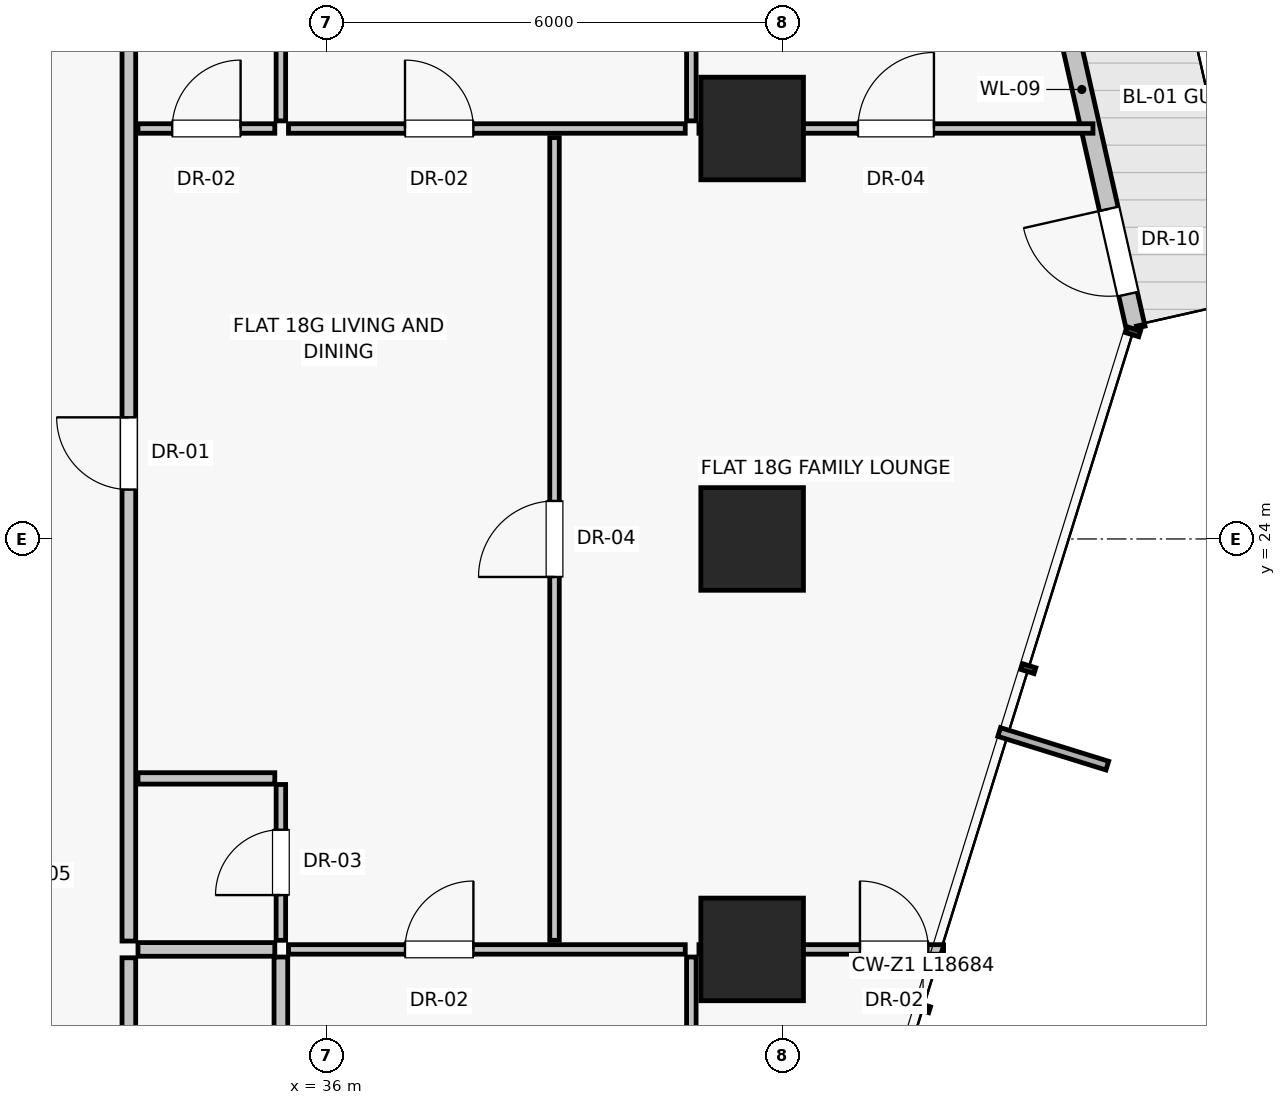
"""IFC4 building model, lengths in metres.
Left out: names, types, materials, properties, quantities, classifications, styles, units other than length and angle.
Written with IfcOpenShell. Run it as: python <this file> out.ifc"""

import sys

from ifc_helpers import new_model, si_unit, direction, frame, frame_2d, origin, origin_2d, place, context, subcontext, project, spatial, rectangle, extrude, source, transform, mapped, element, fill, save


model = new_model("IFC4")
c1 = context("Model", 3, precision=1e-05, world=origin(), true_north=direction((0.0, 1.0)))
c2 = subcontext(c1, "Body", "Model", "MODEL_VIEW")
j1 = project(units=[si_unit("LENGTHUNIT", "METRE"), si_unit("PLANEANGLEUNIT", "RADIAN")], contexts=[c1])
p1 = place(None, origin())
s1 = spatial("IfcSite", under=j1, at=p1, CompositionType="ELEMENT")
p2 = place(p1, origin())
s2 = spatial("IfcBuilding", under=s1, at=p2, CompositionType="ELEMENT")
p3 = place(p2, frame((0.0, 0.0, 67.35)))
s3 = spatial("IfcBuildingStorey", under=s2, at=p3, CompositionType="ELEMENT", Elevation=67.35)
for number, where, z_axis, x_axis in (
    (1, (41.6, 18.6, 0.0), (0.0, 0.0, 1.0), (1.0, 0.0, 0.0)),
    (2, (41.6, 24.0, 0.0), (0.0, 0.0, 1.0), (1.0, 0.0, 0.0)),
    (3, (41.6, 29.4, 0.0), (0.0, 0.0, 1.0), (1.0, 0.0, 0.0)),
):
    element("IfcColumn", number, at=place(p3, frame(where, z_axis=z_axis, x_axis=x_axis)), inside=s3, PredefinedType="COLUMN", context=c2, shape_type="SweptSolid", body=[
        extrude(rectangle(XDim=1.35, YDim=1.35, at=origin_2d()), origin(), (0.0, 0.0, 1.0), 3.25),
    ])
p4 = place(p3, frame((46.647, 26.773, 0.0), z_axis=(0.0, 0.0, 1.0), x_axis=(-0.220535742642, 0.97537889367, 0.0)))
e4 = element("IfcWall", 4, at=p4, inside=s3, PredefinedType="SOLIDWALL", context=c2, shape_type="SweptSolid", body=[
    extrude(rectangle(XDim=4.58, YDim=0.25, at=frame_2d((2.29, 0.0))), origin(), (0.0, 0.0, 1.0), 3.0),
])
p5 = place(p4, frame((0.46, 0.0, 0.0)))
e5 = element("IfcOpeningElement", 5, at=p5, cuts=e4, PredefinedType="OPENING", context=c2, shape_type="SweptSolid", body=[
    extrude(rectangle(XDim=1.15, YDim=2.25, at=frame_2d((0.575, 1.125))), frame((0.0, 0.135, 0.0), z_axis=(0.0, -1.0, 0.0), x_axis=(1.0, 0.0, 0.0)), (0.0, 0.0, 1.0), 0.27),
])
p6 = place(p3, frame((33.4, 14.31, 0.0), z_axis=(0.0, 0.0, 1.0), x_axis=(0.0, 1.0, 0.0)))
e6 = element("IfcWall", 6, at=p6, inside=s3, PredefinedType="PARTITIONING", context=c2, shape_type="SweptSolid", body=[
    extrude(rectangle(XDim=4.18, YDim=0.18, at=frame_2d((2.09, 0.0))), origin(), (0.0, 0.0, 1.0), 3.0),
])
p7 = place(p6, frame((1.59, 0.0, 0.0)))
e7 = element("IfcOpeningElement", 7, at=p7, cuts=e6, PredefinedType="OPENING", context=c2, shape_type="SweptSolid", body=[
    extrude(rectangle(XDim=1.0, YDim=2.01, at=frame_2d((0.5, 1.005))), frame((0.0, 0.1, 0.0), z_axis=(0.0, -1.0, 0.0), x_axis=(1.0, 0.0, 0.0)), (0.0, 0.0, 1.0), 0.2),
])
p8 = place(p3, frame((33.4, 18.71, 0.0), z_axis=(0.0, 0.0, 1.0), x_axis=(0.0, 1.0, 0.0)))
e8 = element("IfcWall", 8, at=p8, inside=s3, PredefinedType="PARTITIONING", context=c2, shape_type="SweptSolid", body=[
    extrude(rectangle(XDim=14.78, YDim=0.18, at=frame_2d((7.39, 0.0))), origin(), (0.0, 0.0, 1.0), 3.0),
])
p9 = place(p8, frame((5.94, 0.0, 0.0)))
e9 = element("IfcOpeningElement", 9, at=p9, cuts=e8, PredefinedType="OPENING", context=c2, shape_type="SweptSolid", body=[
    extrude(rectangle(XDim=0.95, YDim=2.02, at=frame_2d((0.475, 1.01))), frame((0.0, 0.1, 0.0), z_axis=(0.0, -1.0, 0.0), x_axis=(1.0, 0.0, 0.0)), (0.0, 0.0, 1.0), 0.2),
])
p10 = place(p3, frame((40.8, 14.32, 0.0), z_axis=(0.0, 0.0, 1.0), x_axis=(0.0, 1.0, 0.0)))
e10 = element("IfcWall", 10, at=p10, inside=s3, PredefinedType="PARTITIONING", context=c2, shape_type="SweptSolid", body=[
    extrude(rectangle(XDim=4.18, YDim=0.125, at=frame_2d((2.09, 0.0))), origin(), (0.0, 0.0, 1.0), 3.0),
])
p11 = place(p3, frame((40.9, 18.6, 0.0), z_axis=(0.0, 0.0, 1.0), x_axis=(1.0, 0.0, 0.0)))
e11 = element("IfcWall", 11, at=p11, inside=s3, PredefinedType="PARTITIONING", context=c2, shape_type="SweptSolid", body=[
    extrude(rectangle(XDim=3.219, YDim=0.125, at=frame_2d((1.609, 0.0))), origin(), (0.0, 0.0, 1.0), 2.299),
])
p12 = place(p11, frame((2.118, 0.0, 0.0)))
e12 = element("IfcOpeningElement", 12, at=p12, cuts=e11, PredefinedType="OPENING", context=c2, shape_type="SweptSolid", body=[
    extrude(rectangle(XDim=0.9, YDim=2.01, at=frame_2d((0.45, 1.005))), frame((0.0, 0.073, 0.0), z_axis=(0.0, -1.0, 0.0), x_axis=(1.0, 0.0, 0.0)), (0.0, 0.0, 1.0), 0.145),
])
p13 = place(p3, frame((40.8, 29.5, 0.0), z_axis=(0.0, 0.0, 1.0), x_axis=(0.0, 1.0, 0.0)))
e13 = element("IfcWall", 13, at=p13, inside=s3, PredefinedType="PARTITIONING", context=c2, shape_type="SweptSolid", body=[
    extrude(rectangle(XDim=3.98, YDim=0.125, at=frame_2d((1.99, 0.0))), origin(), (0.0, 0.0, 1.0), 3.0),
])
p14 = place(p3, frame((40.9, 29.4, 0.0), z_axis=(0.0, 0.0, 1.0), x_axis=(1.0, 0.0, 0.0)))
e14 = element("IfcWall", 14, at=p14, inside=s3, PredefinedType="PARTITIONING", context=c2, shape_type="SweptSolid", body=[
    extrude(rectangle(XDim=5.184, YDim=0.125, at=frame_2d((2.592, 0.0))), origin(), (0.0, 0.0, 1.0), 2.299),
])
p15 = place(p14, frame((2.092, 0.0, 0.0)))
e15 = element("IfcOpeningElement", 15, at=p15, cuts=e14, PredefinedType="OPENING", context=c2, shape_type="SweptSolid", body=[
    extrude(rectangle(XDim=1.0, YDim=2.01, at=frame_2d((0.5, 1.005))), frame((0.0, 0.073, 0.0), z_axis=(0.0, -1.0, 0.0), x_axis=(1.0, 0.0, 0.0)), (0.0, 0.0, 1.0), 0.145),
])
p16 = place(p3, frame((39.0, 18.72, 0.0), z_axis=(0.0, 0.0, 1.0), x_axis=(0.0, 1.0, 0.0)))
e16 = element("IfcWall", 16, at=p16, inside=s3, PredefinedType="PARTITIONING", context=c2, shape_type="SweptSolid", body=[
    extrude(rectangle(XDim=10.56, YDim=0.125, at=frame_2d((5.28, 0.0))), origin(), (0.0, 0.0, 1.0), 3.0),
])
p17 = place(p16, frame((4.78, 0.0, 0.0)))
e17 = element("IfcOpeningElement", 17, at=p17, cuts=e16, PredefinedType="OPENING", context=c2, shape_type="SweptSolid", body=[
    extrude(rectangle(XDim=1.0, YDim=2.01, at=frame_2d((0.5, 1.005))), frame((0.0, 0.073, 0.0), z_axis=(0.0, -1.0, 0.0), x_axis=(1.0, 0.0, 0.0)), (0.0, 0.0, 1.0), 0.145),
])
p18 = place(p3, frame((35.4, 14.32, 0.0), z_axis=(0.0, 0.0, 1.0), x_axis=(0.0, 1.0, 0.0)))
e18 = element("IfcWall", 18, at=p18, inside=s3, PredefinedType="PARTITIONING", context=c2, shape_type="SweptSolid", body=[
    extrude(rectangle(XDim=4.18, YDim=0.18, at=frame_2d((2.09, 0.0))), origin(), (0.0, 0.0, 1.0), 3.0),
])
p19 = place(p3, frame((33.52, 18.6, 0.0), z_axis=(0.0, 0.0, 1.0), x_axis=(1.0, 0.0, 0.0)))
e19 = element("IfcWall", 19, at=p19, inside=s3, PredefinedType="PARTITIONING", context=c2, shape_type="SweptSolid", body=[
    extrude(rectangle(XDim=1.8, YDim=0.18, at=frame_2d((0.9, 0.0))), origin(), (0.0, 0.0, 1.0), 3.0),
])
p20 = place(p3, frame((35.5, 18.6, 0.0), z_axis=(0.0, 0.0, 1.0), x_axis=(1.0, 0.0, 0.0)))
e20 = element("IfcWall", 20, at=p20, inside=s3, PredefinedType="PARTITIONING", context=c2, shape_type="SweptSolid", body=[
    extrude(rectangle(XDim=5.22, YDim=0.125, at=frame_2d((2.61, 0.0))), origin(), (0.0, 0.0, 1.0), 2.299),
])
p21 = place(p20, frame((1.533, 0.0, 0.0)))
e21 = element("IfcOpeningElement", 21, at=p21, cuts=e20, PredefinedType="OPENING", context=c2, shape_type="SweptSolid", body=[
    extrude(rectangle(XDim=0.9, YDim=2.01, at=frame_2d((0.45, 1.005))), frame((0.0, 0.073, 0.0), z_axis=(0.0, -1.0, 0.0), x_axis=(1.0, 0.0, 0.0)), (0.0, 0.0, 1.0), 0.145),
])
p22 = place(p3, frame((33.52, 20.85, 0.0), z_axis=(0.0, 0.0, 1.0), x_axis=(1.0, 0.0, 0.0)))
e22 = element("IfcWall", 22, at=p22, inside=s3, PredefinedType="PARTITIONING", context=c2, shape_type="SweptSolid", body=[
    extrude(rectangle(XDim=1.8, YDim=0.15, at=frame_2d((0.9, 0.0))), origin(), (0.0, 0.0, 1.0), 3.0),
])
p23 = place(p3, frame((35.4, 18.72, 0.0), z_axis=(0.0, 0.0, 1.0), x_axis=(0.0, 1.0, 0.0)))
e23 = element("IfcWall", 23, at=p23, inside=s3, PredefinedType="PARTITIONING", context=c2, shape_type="SweptSolid", body=[
    extrude(rectangle(XDim=2.05, YDim=0.125, at=frame_2d((1.025, 0.0))), origin(), (0.0, 0.0, 1.0), 3.0),
])
p24 = place(p23, frame((0.595, 0.0, 0.0)))
e24 = element("IfcOpeningElement", 24, at=p24, cuts=e23, PredefinedType="OPENING", context=c2, shape_type="SweptSolid", body=[
    extrude(rectangle(XDim=0.86, YDim=2.01, at=frame_2d((0.43, 1.005))), frame((0.0, 0.073, 0.0), z_axis=(0.0, -1.0, 0.0), x_axis=(1.0, 0.0, 0.0)), (0.0, 0.0, 1.0), 0.145),
])
p25 = place(p3, frame((33.52, 29.4, 0.0), z_axis=(0.0, 0.0, 1.0), x_axis=(1.0, 0.0, 0.0)))
e25 = element("IfcWall", 25, at=p25, inside=s3, PredefinedType="PARTITIONING", context=c2, shape_type="SweptSolid", body=[
    extrude(rectangle(XDim=1.8, YDim=0.125, at=frame_2d((0.9, 0.0))), origin(), (0.0, 0.0, 1.0), 3.0),
])
p26 = place(p25, frame((0.45, 0.0, 0.0)))
e26 = element("IfcOpeningElement", 26, at=p26, cuts=e25, PredefinedType="OPENING", context=c2, shape_type="SweptSolid", body=[
    extrude(rectangle(XDim=0.9, YDim=2.01, at=frame_2d((0.45, 1.005))), frame((0.0, 0.073, 0.0), z_axis=(0.0, -1.0, 0.0), x_axis=(1.0, 0.0, 0.0)), (0.0, 0.0, 1.0), 0.145),
])
p27 = place(p3, frame((35.4, 29.5, 0.0), z_axis=(0.0, 0.0, 1.0), x_axis=(0.0, 1.0, 0.0)))
e27 = element("IfcWall", 27, at=p27, inside=s3, PredefinedType="PARTITIONING", context=c2, shape_type="SweptSolid", body=[
    extrude(rectangle(XDim=3.98, YDim=0.125, at=frame_2d((1.99, 0.0))), origin(), (0.0, 0.0, 1.0), 3.0),
])
p28 = place(p3, frame((35.5, 29.4, 0.0), z_axis=(0.0, 0.0, 1.0), x_axis=(1.0, 0.0, 0.0)))
e28 = element("IfcWall", 28, at=p28, inside=s3, PredefinedType="PARTITIONING", context=c2, shape_type="SweptSolid", body=[
    extrude(rectangle(XDim=5.22, YDim=0.125, at=frame_2d((2.61, 0.0))), origin(), (0.0, 0.0, 1.0), 2.299),
])
p29 = place(p28, frame((1.533, 0.0, 0.0)))
e29 = element("IfcOpeningElement", 29, at=p29, cuts=e28, PredefinedType="OPENING", context=c2, shape_type="SweptSolid", body=[
    extrude(rectangle(XDim=0.9, YDim=2.01, at=frame_2d((0.45, 1.005))), frame((0.0, 0.073, 0.0), z_axis=(0.0, -1.0, 0.0), x_axis=(1.0, 0.0, 0.0)), (0.0, 0.0, 1.0), 0.145),
])
m1 = source(origin(), c2, "Body", "SweptSolid", [
    extrude(rectangle(XDim=1.15, YDim=2.25, at=frame_2d((0.575, 1.125))), frame((0.0, 0.025, 0.0), z_axis=(0.0, -1.0, 0.0), x_axis=(1.0, 0.0, 0.0)), (0.0, 0.0, 1.0), 0.05),
])
p30 = place(p5, frame((1.15, 0.0, 0.0), z_axis=(0.0, 0.0, 1.0), x_axis=(-1.0, 0.0, 0.0)))
e30 = element("IfcDoor", 30, at=p30, inside=s3, OperationType="SINGLE_SWING_RIGHT", PredefinedType="DOOR", context=c2, shape_type="MappedRepresentation", body=[
    mapped(m1, transform((0.0, 0.0, 0.0), scale=1.0)),
])
fill(e5, e30)
m2 = source(origin(), c2, "Body", "SweptSolid", [
    extrude(rectangle(XDim=0.95, YDim=2.02, at=frame_2d((0.475, 1.01))), frame((0.0, 0.025, 0.0), z_axis=(0.0, -1.0, 0.0), x_axis=(1.0, 0.0, 0.0)), (0.0, 0.0, 1.0), 0.05),
])
p31 = place(p9, origin())
e31 = element("IfcDoor", 31, at=p31, inside=s3, OperationType="SINGLE_SWING_RIGHT", PredefinedType="DOOR", context=c2, shape_type="MappedRepresentation", body=[
    mapped(m2, transform((0.0, 0.0, 0.0), scale=1.0)),
])
fill(e9, e31)
m3 = source(origin(), c2, "Body", "SweptSolid", [
    extrude(rectangle(XDim=0.9, YDim=2.01, at=frame_2d((0.45, 1.005))), frame((0.0, 0.025, 0.0), z_axis=(0.0, -1.0, 0.0), x_axis=(1.0, 0.0, 0.0)), (0.0, 0.0, 1.0), 0.05),
])
p32 = place(p12, origin())
e32 = element("IfcDoor", 32, at=p32, inside=s3, OperationType="SINGLE_SWING_LEFT", PredefinedType="DOOR", context=c2, shape_type="MappedRepresentation", body=[
    mapped(m3, transform((0.0, 0.0, 0.0), scale=1.0)),
])
fill(e12, e32)
m4 = source(origin(), c2, "Body", "SweptSolid", [
    extrude(rectangle(XDim=1.0, YDim=2.01, at=frame_2d((0.5, 1.005))), frame((0.0, 0.025, 0.0), z_axis=(0.0, -1.0, 0.0), x_axis=(1.0, 0.0, 0.0)), (0.0, 0.0, 1.0), 0.05),
])
p33 = place(p15, origin())
e33 = element("IfcDoor", 33, at=p33, inside=s3, OperationType="SINGLE_SWING_RIGHT", PredefinedType="DOOR", context=c2, shape_type="MappedRepresentation", body=[
    mapped(m4, transform((0.0, 0.0, 0.0), scale=1.0)),
])
fill(e15, e33)
p34 = place(p17, origin())
e34 = element("IfcDoor", 34, at=p34, inside=s3, OperationType="SINGLE_SWING_LEFT", PredefinedType="DOOR", context=c2, shape_type="MappedRepresentation", body=[
    mapped(m4, transform((0.0, 0.0, 0.0), scale=1.0)),
])
fill(e17, e34)
p35 = place(p21, origin())
e35 = element("IfcDoor", 35, at=p35, inside=s3, OperationType="SINGLE_SWING_RIGHT", PredefinedType="DOOR", context=c2, shape_type="MappedRepresentation", body=[
    mapped(m3, transform((0.0, 0.0, 0.0), scale=1.0)),
])
fill(e21, e35)
m5 = source(origin(), c2, "Body", "SweptSolid", [
    extrude(rectangle(XDim=0.86, YDim=2.01, at=frame_2d((0.43, 1.005))), frame((0.0, 0.025, 0.0), z_axis=(0.0, -1.0, 0.0), x_axis=(1.0, 0.0, 0.0)), (0.0, 0.0, 1.0), 0.05),
])
p36 = place(p24, origin())
e36 = element("IfcDoor", 36, at=p36, inside=s3, OperationType="SINGLE_SWING_LEFT", PredefinedType="DOOR", context=c2, shape_type="MappedRepresentation", body=[
    mapped(m5, transform((0.0, 0.0, 0.0), scale=1.0)),
])
fill(e24, e36)
p37 = place(p26, origin())
e37 = element("IfcDoor", 37, at=p37, inside=s3, OperationType="SINGLE_SWING_RIGHT", PredefinedType="DOOR", context=c2, shape_type="MappedRepresentation", body=[
    mapped(m3, transform((0.0, 0.0, 0.0), scale=1.0)),
])
fill(e26, e37)
p38 = place(p29, origin())
e38 = element("IfcDoor", 38, at=p38, inside=s3, OperationType="SINGLE_SWING_LEFT", PredefinedType="DOOR", context=c2, shape_type="MappedRepresentation", body=[
    mapped(m3, transform((0.0, 0.0, 0.0), scale=1.0)),
])
fill(e29, e38)
save(model, sys.argv[1])
